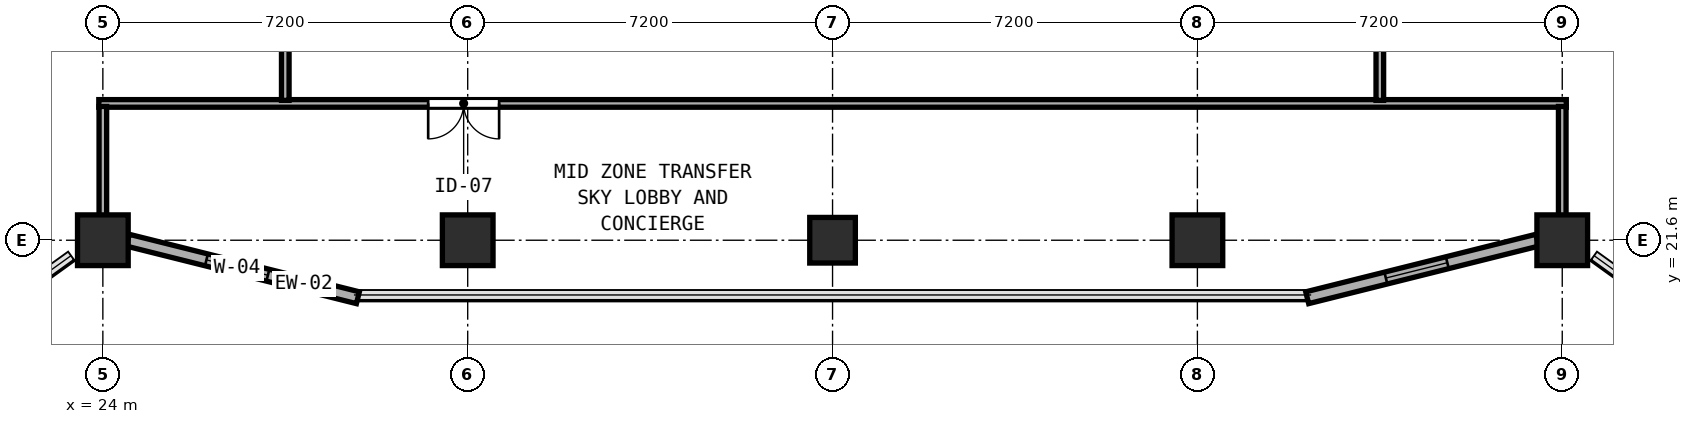
"""IFC4 building model, lengths in metres.
Left out: names, types, materials, properties, quantities, classifications, styles, units other than length and angle.
Written with IfcOpenShell. Run it as: python <this file> out.ifc"""

import sys

from ifc_helpers import new_model, si_unit, direction, frame, frame_2d, origin, origin_2d, place, context, subcontext, project, spatial, rectangle, hollow_rectangle, extrude, element, fill, save


model = new_model("IFC4")
c1 = context("Model", 3, precision=1e-05, world=origin(), true_north=direction((0.0, 1.0)))
c2 = subcontext(c1, "Body", "Model", "MODEL_VIEW")
j1 = project(units=[si_unit("LENGTHUNIT", "METRE"), si_unit("PLANEANGLEUNIT", "RADIAN")], contexts=[c1])
p1 = place(None, origin())
s1 = spatial("IfcSite", under=j1, at=p1, CompositionType="ELEMENT")
p2 = place(p1, origin())
s2 = spatial("IfcBuilding", under=s1, at=p2, CompositionType="ELEMENT")
p3 = place(p2, frame((0.0, 0.0, 94.0)))
s3 = spatial("IfcBuildingStorey", under=s2, at=p3, CompositionType="ELEMENT", Elevation=94.0)
for number, where, z_axis, x_axis in (
    (1, (24.0, 21.6, 0.0), (0.0, 0.0, 1.0), (1.0, 0.0, 0.0)),
    (2, (52.8, 21.6, 0.0), (0.0, 0.0, 1.0), (1.0, 0.0, 0.0)),
    (3, (31.2, 21.6, 0.0), (0.0, 0.0, 1.0), (1.0, 0.0, 0.0)),
    (4, (45.6, 21.6, 0.0), (0.0, 0.0, 1.0), (1.0, 0.0, 0.0)),
):
    element("IfcColumn", number, at=place(p3, frame(where, z_axis=z_axis, x_axis=x_axis)), inside=s3, PredefinedType="COLUMN", context=c2, shape_type="SweptSolid", body=[
        extrude(hollow_rectangle(XDim=1.0, YDim=1.0, WallThickness=0.038, at=origin_2d()), origin(), (0.0, 0.0, 1.0), 4.4),
    ])
p4 = place(p3, frame((38.4, 21.6, 0.0), z_axis=(0.0, 0.0, 1.0), x_axis=(1.0, 0.0, 0.0)))
e5 = element("IfcColumn", 5, at=p4, inside=s3, PredefinedType="COLUMN", context=c2, shape_type="SweptSolid", body=[
    extrude(hollow_rectangle(XDim=0.9, YDim=0.9, WallThickness=0.034, at=origin_2d()), origin(), (0.0, 0.0, 1.0), 4.4),
])
p5 = place(p3, frame((24.492, 21.601, 0.0), z_axis=(0.0, 0.0, 1.0), x_axis=(0.970145568042, -0.242523353121, 0.0)))
e6 = element("IfcWall", 6, at=p5, inside=s3, PredefinedType="SOLIDWALL", context=c2, shape_type="SweptSolid", body=[
    extrude(rectangle(XDim=4.681, YDim=0.24, at=frame_2d((2.34, 0.0))), origin(), (0.0, 0.0, 1.0), 3.745),
])
p6 = place(p5, frame((1.6, 0.0, 0.85)))
e7 = element("IfcOpeningElement", 7, at=p6, cuts=e6, PredefinedType="OPENING", context=c2, shape_type="SweptSolid", body=[
    extrude(rectangle(XDim=1.25, YDim=1.95, at=frame_2d((0.625, 0.975))), frame((0.0, 0.13, 0.0), z_axis=(0.0, -1.0, 0.0), x_axis=(1.0, 0.0, 0.0)), (0.0, 0.0, 1.0), 0.26),
])
p7 = place(p3, frame((47.767, 20.465, 0.0), z_axis=(0.0, 0.0, 1.0), x_axis=(0.970145568042, 0.242523353121, 0.0)))
e8 = element("IfcWall", 8, at=p7, inside=s3, PredefinedType="SOLIDWALL", context=c2, shape_type="SweptSolid", body=[
    extrude(rectangle(XDim=4.681, YDim=0.24, at=frame_2d((2.34, 0.0))), origin(), (0.0, 0.0, 1.0), 3.745),
])
p8 = place(p7, frame((1.6, 0.0, 0.85)))
e9 = element("IfcOpeningElement", 9, at=p8, cuts=e8, PredefinedType="OPENING", context=c2, shape_type="SweptSolid", body=[
    extrude(rectangle(XDim=1.25, YDim=1.95, at=frame_2d((0.625, 0.975))), frame((0.0, 0.13, 0.0), z_axis=(0.0, -1.0, 0.0), x_axis=(1.0, 0.0, 0.0)), (0.0, 0.0, 1.0), 0.26),
])
p9 = place(p3, frame((23.92, 24.3, 0.0), z_axis=(0.0, 0.0, 1.0), x_axis=(1.0, 0.0, 0.0)))
e10 = element("IfcWall", 10, at=p9, inside=s3, PredefinedType="PARTITIONING", context=c2, shape_type="SweptSolid", body=[
    extrude(rectangle(XDim=28.96, YDim=0.15, at=frame_2d((14.48, 0.0))), origin(), (0.0, 0.0, 1.0), 4.2),
])
p10 = place(p9, frame((7.9, 0.0, 0.0), z_axis=(0.0, 0.0, 1.0), x_axis=(-1.0, 0.0, 0.0)))
e11 = element("IfcOpeningElement", 11, at=p10, cuts=e10, PredefinedType="OPENING", context=c2, shape_type="SweptSolid", body=[
    extrude(rectangle(XDim=1.4, YDim=2.18, at=frame_2d((0.7, 1.09))), frame((0.0, 0.085, 0.0), z_axis=(0.0, -1.0, 0.0), x_axis=(1.0, 0.0, 0.0)), (0.0, 0.0, 1.0), 0.17),
])
for number, where, z_axis, x_axis in (
    (12, (24.0, 21.819, 0.0), (0.0, 0.0, 1.0), (0.0, 1.0, 0.0)),
    (13, (52.8, 21.819, 0.0), (0.0, 0.0, 1.0), (0.0, 1.0, 0.0)),
):
    element("IfcWall", number, at=place(p3, frame(where, z_axis=z_axis, x_axis=x_axis)), inside=s3, PredefinedType="PARTITIONING", context=c2, shape_type="SweptSolid", body=[
        extrude(rectangle(XDim=2.421, YDim=0.15, at=frame_2d((1.211, 0.0))), origin(), (0.0, 0.0, 1.0), 3.745),
    ])
p11 = place(p3, frame((49.2, 24.36, 0.0), z_axis=(0.0, 0.0, 1.0), x_axis=(0.0, 1.0, 0.0)))
e14 = element("IfcWall", 14, at=p11, inside=s3, PredefinedType="PARTITIONING", context=c2, shape_type="SweptSolid", body=[
    extrude(rectangle(XDim=20.58, YDim=0.15, at=frame_2d((10.29, 0.0))), origin(), (0.0, 0.0, 1.0), 4.2),
])
p12 = place(p11, frame((12.789, 0.0, 0.0)))
e15 = element("IfcOpeningElement", 15, at=p12, cuts=e14, PredefinedType="OPENING", context=c2, shape_type="SweptSolid", body=[
    extrude(rectangle(XDim=1.4, YDim=2.18, at=frame_2d((0.7, 1.09))), frame((0.0, 0.085, 0.0), z_axis=(0.0, -1.0, 0.0), x_axis=(1.0, 0.0, 0.0)), (0.0, 0.0, 1.0), 0.17),
])
p13 = place(p3, frame((27.6, 24.36, 0.0), z_axis=(0.0, 0.0, 1.0), x_axis=(0.0, 1.0, 0.0)))
e16 = element("IfcWall", 16, at=p13, inside=s3, PredefinedType="PARTITIONING", context=c2, shape_type="SweptSolid", body=[
    extrude(rectangle(XDim=3.68, YDim=0.15, at=frame_2d((1.84, 0.0))), origin(), (0.0, 0.0, 1.0), 4.2),
])
p14 = place(p13, frame((3.54, 0.0, 0.0), z_axis=(0.0, 0.0, 1.0), x_axis=(-1.0, 0.0, 0.0)))
e17 = element("IfcOpeningElement", 17, at=p14, cuts=e16, PredefinedType="OPENING", context=c2, shape_type="SweptSolid", body=[
    extrude(rectangle(XDim=0.95, YDim=2.12, at=frame_2d((0.475, 1.06))), frame((0.0, 0.085, 0.0), z_axis=(0.0, -1.0, 0.0), x_axis=(1.0, 0.0, 0.0)), (0.0, 0.0, 1.0), 0.17),
])
p15 = place(p6, origin())
e18 = element("IfcWindow", 18, at=p15, inside=s3, PartitioningType="SINGLE_PANEL", PredefinedType="WINDOW", context=c2, shape_type="SweptSolid", body=[
    extrude(rectangle(XDim=1.25, YDim=1.95, at=frame_2d((0.625, 0.975))), frame((0.0, 0.03, 0.0), z_axis=(0.0, -1.0, 0.0), x_axis=(1.0, 0.0, 0.0)), (0.0, 0.0, 1.0), 0.06),
])
fill(e7, e18)
p16 = place(p8, origin())
e19 = element("IfcWindow", 19, at=p16, inside=s3, PartitioningType="SINGLE_PANEL", PredefinedType="WINDOW", context=c2, shape_type="SweptSolid", body=[
    extrude(rectangle(XDim=1.25, YDim=1.95, at=frame_2d((0.625, 0.975))), frame((0.0, 0.03, 0.0), z_axis=(0.0, -1.0, 0.0), x_axis=(1.0, 0.0, 0.0)), (0.0, 0.0, 1.0), 0.06),
])
fill(e9, e19)
p17 = place(p10, origin())
e20 = element("IfcDoor", 20, at=p17, inside=s3, OperationType="DOUBLE_DOOR_SINGLE_SWING", PredefinedType="DOOR", context=c2, shape_type="SweptSolid", body=[
    extrude(rectangle(XDim=1.4, YDim=2.18, at=frame_2d((0.7, 1.09))), frame((0.0, 0.025, 0.0), z_axis=(0.0, -1.0, 0.0), x_axis=(1.0, 0.0, 0.0)), (0.0, 0.0, 1.0), 0.05),
])
fill(e11, e20)
save(model, sys.argv[1])
